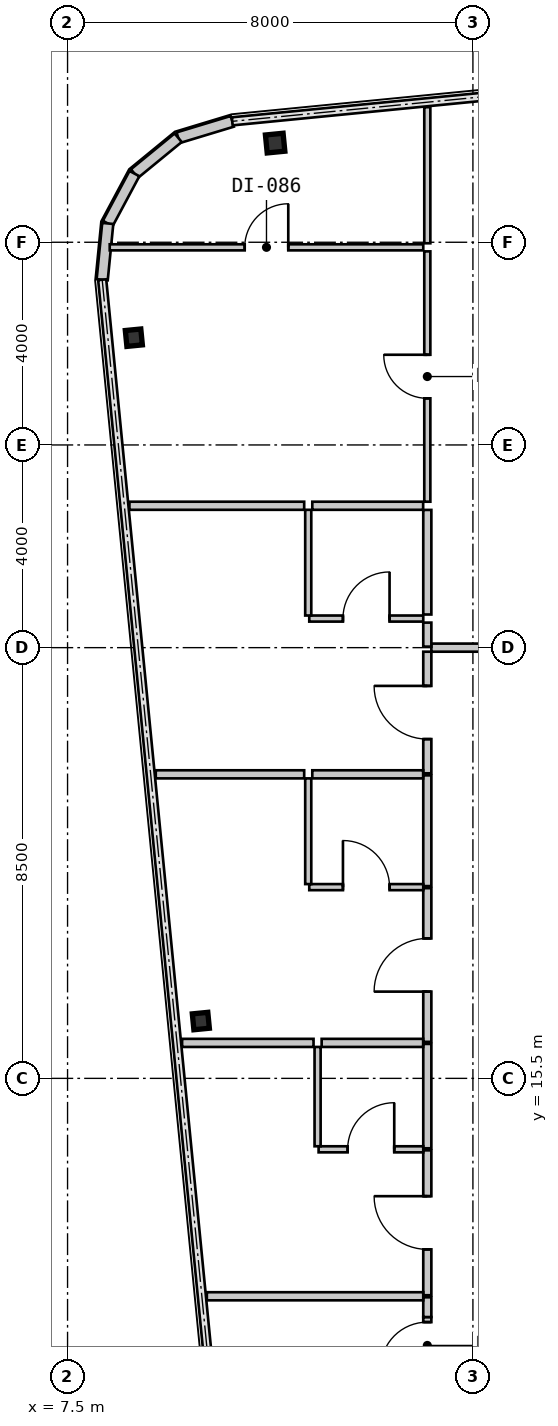
"""IFC4 building model, lengths in metres.
Left out: names, types, materials, properties, quantities, classifications, styles, units other than length and angle.
Written with IfcOpenShell. Run it as: python <this file> out.ifc"""

import sys

from ifc_helpers import new_model, si_unit, direction, frame, frame_2d, origin, origin_2d, place, context, subcontext, project, spatial, rectangle, i_section, extrude, source, transform, mapped, element, fill, save


model = new_model("IFC4")
c1 = context("Model", 3, precision=1e-05, world=origin(), true_north=direction((0.0, 1.0)))
c2 = subcontext(c1, "Body", "Model", "MODEL_VIEW")
j1 = project(units=[si_unit("LENGTHUNIT", "METRE"), si_unit("PLANEANGLEUNIT", "RADIAN")], contexts=[c1])
p1 = place(None, origin())
s1 = spatial("IfcSite", under=j1, at=p1, CompositionType="ELEMENT")
p2 = place(p1, origin())
s2 = spatial("IfcBuilding", under=s1, at=p2, CompositionType="ELEMENT")
p3 = place(p2, frame((0.0, 0.0, 68.25)))
s3 = spatial("IfcBuildingStorey", under=s2, at=p3, CompositionType="ELEMENT", Elevation=68.25)
m1 = source(origin(), c2, "Body", "SweptSolid", [
    extrude(i_section(OverallWidth=0.35, OverallDepth=0.356, WebThickness=0.018, FlangeThickness=0.028, at=origin_2d()), origin(), (0.0, 0.0, 1.0), 3.15),
])
p4 = place(p3, frame((11.597, 33.957, 0.0), z_axis=(0.0, 0.0, 1.0), x_axis=(0.995227399982, 0.097582899759, 0.0)))
e1 = element("IfcColumn", 1, at=p4, inside=s3, PredefinedType="COLUMN", context=c2, shape_type="MappedRepresentation", body=[
    mapped(m1, transform((0.0, 0.0, 0.0), scale=1.0)),
])
m2 = source(origin(), c2, "Body", "SweptSolid", [
    extrude(i_section(OverallWidth=0.307, OverallDepth=0.315, WebThickness=0.012, FlangeThickness=0.019, at=origin_2d()), origin(), (0.0, 0.0, 1.0), 3.15),
])
for number, where, z_axis, x_axis in (
    (2, (10.131, 16.631, 0.0), (0.0, 0.0, 1.0), (0.995, 0.098, 0.0)),
    (3, (8.808, 30.116, 0.0), (0.0, 0.0, 1.0), (0.995, 0.098, 0.0)),
):
    element("IfcColumn", number, at=place(p3, frame(where, z_axis=z_axis, x_axis=x_axis)), inside=s3, PredefinedType="COLUMN", context=c2, shape_type="MappedRepresentation", body=[
        mapped(m2, transform((0.0, 0.0, 0.0), scale=1.0)),
    ])
m3 = source(origin(), c2, "Body", "SweptSolid", [
    extrude(rectangle(XDim=1.116, YDim=0.22, at=frame_2d((0.558, 0.0))), origin(), (0.0, 0.0, 1.0), 2.93),
])
p5 = place(p3, frame((10.751, 34.386, 0.0), z_axis=(0.0, 0.0, 1.0), x_axis=(-0.957070388811, -0.289855603468, 0.0)))
e4 = element("IfcWall", 4, at=p5, inside=s3, PredefinedType="SOLIDWALL", context=c2, shape_type="MappedRepresentation", body=[
    mapped(m3, transform((0.0, 0.0, 0.0), scale=1.0)),
])
m4 = source(origin(), c2, "Body", "SweptSolid", [
    extrude(rectangle(XDim=1.116, YDim=0.22, at=frame_2d((0.558, 0.0))), origin(), (0.0, 0.0, 1.0), 2.93),
])
p6 = place(p3, frame((9.683, 34.063, 0.0), z_axis=(0.0, 0.0, 1.0), x_axis=(-0.773254916409, -0.634095287989, 0.0)))
e5 = element("IfcWall", 5, at=p6, inside=s3, PredefinedType="SOLIDWALL", context=c2, shape_type="MappedRepresentation", body=[
    mapped(m4, transform((0.0, 0.0, 0.0), scale=1.0)),
])
m5 = source(origin(), c2, "Body", "SweptSolid", [
    extrude(rectangle(XDim=1.116, YDim=0.22, at=frame_2d((0.558, 0.0))), origin(), (0.0, 0.0, 1.0), 2.93),
])
p7 = place(p3, frame((8.82, 33.355, 0.0), z_axis=(0.0, 0.0, 1.0), x_axis=(-0.471802540493, -0.881704237704, 0.0)))
e6 = element("IfcWall", 6, at=p7, inside=s3, PredefinedType="SOLIDWALL", context=c2, shape_type="MappedRepresentation", body=[
    mapped(m5, transform((0.0, 0.0, 0.0), scale=1.0)),
])
p8 = place(p3, frame((8.293, 32.371, 0.0), z_axis=(0.0, 0.0, 1.0), x_axis=(-0.098463783145, -0.99514063499, 0.0)))
e7 = element("IfcWall", 7, at=p8, inside=s3, PredefinedType="SOLIDWALL", context=c2, shape_type="MappedRepresentation", body=[
    mapped(m4, transform((0.0, 0.0, 0.0), scale=1.0)),
])
m6 = source(origin(), c2, "Body", "SweptSolid", [
    extrude(rectangle(XDim=1.51, YDim=0.16, at=frame_2d((0.755, 0.0))), origin(), (0.0, 0.0, 1.0), 2.623),
])
p9 = place(p3, frame((14.6, 9.28, 0.0), z_axis=(0.0, 0.0, 1.0), x_axis=(0.0, 1.0, 0.0)))
e8 = element("IfcWall", 8, at=p9, inside=s3, PredefinedType="PARTITIONING", context=c2, shape_type="MappedRepresentation", body=[
    mapped(m6, transform((0.0, 0.0, 0.0), scale=1.0)),
])
m7 = source(origin(), c2, "Body", "SweptSolid", [
    extrude(rectangle(XDim=0.92, YDim=2.1, at=frame_2d((0.46, 1.05))), frame((0.0, 0.09, 0.0), z_axis=(0.0, -1.0, 0.0), x_axis=(1.0, 0.0, 0.0)), (0.0, 0.0, 1.0), 0.18),
])
p10 = place(p9, frame((0.49, 0.0, 0.0)))
e9 = element("IfcOpeningElement", 9, at=p10, cuts=e8, PredefinedType="OPENING", context=c2, shape_type="MappedRepresentation", body=[
    mapped(m7, transform((0.0, 0.0, 0.0), scale=1.0)),
])
m8 = source(origin(), c2, "Body", "SweptSolid", [
    extrude(rectangle(XDim=0.39, YDim=0.16, at=frame_2d((0.195, 0.0))), origin(), (0.0, 0.0, 1.0), 2.93),
])
p11 = place(p3, frame((14.6, 10.79, 0.0), z_axis=(0.0, 0.0, 1.0), x_axis=(0.0, 1.0, 0.0)))
e10 = element("IfcWall", 10, at=p11, inside=s3, PredefinedType="PARTITIONING", context=c2, shape_type="MappedRepresentation", body=[
    mapped(m8, transform((0.0, 0.0, 0.0), scale=1.0)),
])
m9 = source(origin(), c2, "Body", "SweptSolid", [
    extrude(rectangle(XDim=2.86, YDim=0.16, at=frame_2d((1.43, 0.0))), origin(), (0.0, 0.0, 1.0), 2.93),
])
p12 = place(p3, frame((14.6, 11.22, 0.0), z_axis=(0.0, 0.0, 1.0), x_axis=(0.0, 1.0, 0.0)))
e11 = element("IfcWall", 11, at=p12, inside=s3, PredefinedType="PARTITIONING", context=c2, shape_type="MappedRepresentation", body=[
    mapped(m9, transform((0.0, 0.0, 0.0), scale=1.0)),
])
m10 = source(origin(), c2, "Body", "SweptSolid", [
    extrude(rectangle(XDim=1.05, YDim=2.1, at=frame_2d((0.525, 1.05))), frame((0.0, 0.09, 0.0), z_axis=(0.0, -1.0, 0.0), x_axis=(1.0, 0.0, 0.0)), (0.0, 0.0, 1.0), 0.18),
])
p13 = place(p12, frame((0.905, 0.0, 0.0)))
e12 = element("IfcOpeningElement", 12, at=p13, cuts=e11, PredefinedType="OPENING", context=c2, shape_type="MappedRepresentation", body=[
    mapped(m10, transform((0.0, 0.0, 0.0), scale=1.0)),
])
m11 = source(origin(), c2, "Body", "SweptSolid", [
    extrude(rectangle(XDim=2.06, YDim=0.16, at=frame_2d((1.03, 0.0))), origin(), (0.0, 0.0, 1.0), 2.93),
])
p14 = place(p3, frame((14.6, 14.12, 0.0), z_axis=(0.0, 0.0, 1.0), x_axis=(0.0, 1.0, 0.0)))
e13 = element("IfcWall", 13, at=p14, inside=s3, PredefinedType="PARTITIONING", context=c2, shape_type="MappedRepresentation", body=[
    mapped(m11, transform((0.0, 0.0, 0.0), scale=1.0)),
])
m12 = source(origin(), c2, "Body", "SweptSolid", [
    extrude(rectangle(XDim=3.034, YDim=0.16, at=frame_2d((1.517, 0.0))), origin(), (0.0, 0.0, 1.0), 2.93),
])
p15 = place(p3, frame((14.6, 16.22, 0.0), z_axis=(0.0, 0.0, 1.0), x_axis=(0.0, 1.0, 0.0)))
e14 = element("IfcWall", 14, at=p15, inside=s3, PredefinedType="PARTITIONING", context=c2, shape_type="MappedRepresentation", body=[
    mapped(m12, transform((0.0, 0.0, 0.0), scale=1.0)),
])
p16 = place(p15, frame((0.992, 0.0, 0.0)))
e15 = element("IfcOpeningElement", 15, at=p16, cuts=e14, PredefinedType="OPENING", context=c2, shape_type="MappedRepresentation", body=[
    mapped(m10, transform((0.0, 0.0, 0.0), scale=1.0)),
])
m13 = source(origin(), c2, "Body", "SweptSolid", [
    extrude(rectangle(XDim=2.186, YDim=0.16, at=frame_2d((1.093, 0.0))), origin(), (0.0, 0.0, 1.0), 2.93),
])
p17 = place(p3, frame((14.6, 19.294, 0.0), z_axis=(0.0, 0.0, 1.0), x_axis=(0.0, 1.0, 0.0)))
e16 = element("IfcWall", 16, at=p17, inside=s3, PredefinedType="PARTITIONING", context=c2, shape_type="MappedRepresentation", body=[
    mapped(m13, transform((0.0, 0.0, 0.0), scale=1.0)),
])
m14 = source(origin(), c2, "Body", "SweptSolid", [
    extrude(rectangle(XDim=2.4, YDim=0.16, at=frame_2d((1.2, 0.0))), origin(), (0.0, 0.0, 1.0), 2.93),
])
p18 = place(p3, frame((14.6, 21.52, 0.0), z_axis=(0.0, 0.0, 1.0), x_axis=(0.0, 1.0, 0.0)))
e17 = element("IfcWall", 17, at=p18, inside=s3, PredefinedType="PARTITIONING", context=c2, shape_type="MappedRepresentation", body=[
    mapped(m14, transform((0.0, 0.0, 0.0), scale=1.0)),
])
p19 = place(p18, frame((0.675, 0.0, 0.0)))
e18 = element("IfcOpeningElement", 18, at=p19, cuts=e17, PredefinedType="OPENING", context=c2, shape_type="MappedRepresentation", body=[
    mapped(m10, transform((0.0, 0.0, 0.0), scale=1.0)),
])
m15 = source(origin(), c2, "Body", "SweptSolid", [
    extrude(rectangle(XDim=4.17, YDim=0.16, at=frame_2d((2.085, 0.0))), origin(), (0.0, 0.0, 1.0), 2.93),
])
p20 = place(p3, frame((14.68, 24.0, 0.0), z_axis=(0.0, 0.0, 1.0), x_axis=(1.0, 0.0, 0.0)))
e19 = element("IfcWall", 19, at=p20, inside=s3, PredefinedType="PARTITIONING", context=c2, shape_type="MappedRepresentation", body=[
    mapped(m15, transform((0.0, 0.0, 0.0), scale=1.0)),
])
p21 = place(p20, frame((1.69, 0.0, 0.0)))
e20 = element("IfcOpeningElement", 20, at=p21, cuts=e19, PredefinedType="OPENING", context=c2, shape_type="MappedRepresentation", body=[
    mapped(m7, transform((0.0, 0.0, 0.0), scale=1.0)),
])
m16 = source(origin(), c2, "Body", "SweptSolid", [
    extrude(rectangle(XDim=4.271, YDim=0.16, at=frame_2d((2.136, 0.0))), origin(), (0.0, 0.0, 1.0), 2.93),
])
p22 = place(p3, frame((10.249, 11.2, 0.0), z_axis=(0.0, 0.0, 1.0), x_axis=(1.0, 0.0, 0.0)))
e21 = element("IfcWall", 21, at=p22, inside=s3, PredefinedType="PARTITIONING", context=c2, shape_type="MappedRepresentation", body=[
    mapped(m16, transform((0.0, 0.0, 0.0), scale=1.0)),
])
m17 = source(origin(), c2, "Body", "SweptSolid", [
    extrude(rectangle(XDim=2.065, YDim=0.12, at=frame_2d((1.033, 0.0))), origin(), (0.0, 0.0, 1.0), 2.93),
])
p23 = place(p3, frame((12.455, 14.1, 0.0), z_axis=(0.0, 0.0, 1.0), x_axis=(1.0, 0.0, 0.0)))
e22 = element("IfcWall", 22, at=p23, inside=s3, PredefinedType="PARTITIONING", context=c2, shape_type="MappedRepresentation", body=[
    mapped(m17, transform((0.0, 0.0, 0.0), scale=1.0)),
])
m18 = source(origin(), c2, "Body", "SweptSolid", [
    extrude(rectangle(XDim=0.92, YDim=2.1, at=frame_2d((0.46, 1.05))), frame((0.0, 0.07, 0.0), z_axis=(0.0, -1.0, 0.0), x_axis=(1.0, 0.0, 0.0)), (0.0, 0.0, 1.0), 0.14),
])
p24 = place(p23, frame((0.573, 0.0, 0.0)))
e23 = element("IfcOpeningElement", 23, at=p24, cuts=e22, PredefinedType="OPENING", context=c2, shape_type="MappedRepresentation", body=[
    mapped(m18, transform((0.0, 0.0, 0.0), scale=1.0)),
])
m19 = source(origin(), c2, "Body", "SweptSolid", [
    extrude(rectangle(XDim=1.96, YDim=0.12, at=frame_2d((0.98, 0.0))), origin(), (0.0, 0.0, 1.0), 2.93),
])
p25 = place(p3, frame((12.435, 16.12, 0.0), z_axis=(0.0, 0.0, 1.0), x_axis=(0.0, -1.0, 0.0)))
e24 = element("IfcWall", 24, at=p25, inside=s3, PredefinedType="PARTITIONING", context=c2, shape_type="MappedRepresentation", body=[
    mapped(m19, transform((0.0, 0.0, 0.0), scale=1.0)),
])
m20 = source(origin(), c2, "Body", "SweptSolid", [
    extrude(rectangle(XDim=2.594, YDim=0.16, at=frame_2d((1.297, 0.0))), origin(), (0.0, 0.0, 1.0), 2.93),
])
p26 = place(p3, frame((9.76, 16.2, 0.0), z_axis=(0.0, 0.0, 1.0), x_axis=(1.0, 0.0, 0.0)))
e25 = element("IfcWall", 25, at=p26, inside=s3, PredefinedType="PARTITIONING", context=c2, shape_type="MappedRepresentation", body=[
    mapped(m20, transform((0.0, 0.0, 0.0), scale=1.0)),
])
m21 = source(origin(), c2, "Body", "SweptSolid", [
    extrude(rectangle(XDim=2.003, YDim=0.16, at=frame_2d((1.002, 0.0))), origin(), (0.0, 0.0, 1.0), 2.93),
])
p27 = place(p3, frame((12.515, 16.2, 0.0), z_axis=(0.0, 0.0, 1.0), x_axis=(1.0, 0.0, 0.0)))
e26 = element("IfcWall", 26, at=p27, inside=s3, PredefinedType="PARTITIONING", context=c2, shape_type="MappedRepresentation", body=[
    mapped(m21, transform((0.0, 0.0, 0.0), scale=1.0)),
])
m22 = source(origin(), c2, "Body", "SweptSolid", [
    extrude(rectangle(XDim=2.25, YDim=0.12, at=frame_2d((1.125, 0.0))), origin(), (0.0, 0.0, 1.0), 2.93),
])
p28 = place(p3, frame((12.27, 19.274, 0.0), z_axis=(0.0, 0.0, 1.0), x_axis=(1.0, 0.0, 0.0)))
e27 = element("IfcWall", 27, at=p28, inside=s3, PredefinedType="PARTITIONING", context=c2, shape_type="MappedRepresentation", body=[
    mapped(m22, transform((0.0, 0.0, 0.0), scale=1.0)),
])
p29 = place(p28, frame((0.665, 0.0, 0.0)))
e28 = element("IfcOpeningElement", 28, at=p29, cuts=e27, PredefinedType="OPENING", context=c2, shape_type="MappedRepresentation", body=[
    mapped(m18, transform((0.0, 0.0, 0.0), scale=1.0)),
])
m23 = source(origin(), c2, "Body", "SweptSolid", [
    extrude(rectangle(XDim=2.086, YDim=0.12, at=frame_2d((1.043, 0.0))), origin(), (0.0, 0.0, 1.0), 2.93),
])
p30 = place(p3, frame((12.25, 21.42, 0.0), z_axis=(0.0, 0.0, 1.0), x_axis=(0.0, -1.0, 0.0)))
e29 = element("IfcWall", 29, at=p30, inside=s3, PredefinedType="PARTITIONING", context=c2, shape_type="MappedRepresentation", body=[
    mapped(m23, transform((0.0, 0.0, 0.0), scale=1.0)),
])
m24 = source(origin(), c2, "Body", "SweptSolid", [
    extrude(rectangle(XDim=2.929, YDim=0.16, at=frame_2d((1.464, 0.0))), origin(), (0.0, 0.0, 1.0), 2.93),
])
p31 = place(p3, frame((9.241, 21.5, 0.0), z_axis=(0.0, 0.0, 1.0), x_axis=(1.0, 0.0, 0.0)))
e30 = element("IfcWall", 30, at=p31, inside=s3, PredefinedType="PARTITIONING", context=c2, shape_type="MappedRepresentation", body=[
    mapped(m24, transform((0.0, 0.0, 0.0), scale=1.0)),
])
m25 = source(origin(), c2, "Body", "SweptSolid", [
    extrude(rectangle(XDim=2.188, YDim=0.16, at=frame_2d((1.094, 0.0))), origin(), (0.0, 0.0, 1.0), 2.93),
])
p32 = place(p3, frame((12.33, 21.5, 0.0), z_axis=(0.0, 0.0, 1.0), x_axis=(1.0, 0.0, 0.0)))
e31 = element("IfcWall", 31, at=p32, inside=s3, PredefinedType="PARTITIONING", context=c2, shape_type="MappedRepresentation", body=[
    mapped(m25, transform((0.0, 0.0, 0.0), scale=1.0)),
])
p33 = place(p3, frame((12.27, 24.574, 0.0), z_axis=(0.0, 0.0, 1.0), x_axis=(1.0, 0.0, 0.0)))
e32 = element("IfcWall", 32, at=p33, inside=s3, PredefinedType="PARTITIONING", context=c2, shape_type="MappedRepresentation", body=[
    mapped(m22, transform((0.0, 0.0, 0.0), scale=1.0)),
])
p34 = place(p33, frame((0.665, 0.0, 0.0)))
e33 = element("IfcOpeningElement", 33, at=p34, cuts=e32, PredefinedType="OPENING", context=c2, shape_type="MappedRepresentation", body=[
    mapped(m18, transform((0.0, 0.0, 0.0), scale=1.0)),
])
p35 = place(p3, frame((12.25, 26.72, 0.0), z_axis=(0.0, 0.0, 1.0), x_axis=(0.0, -1.0, 0.0)))
e34 = element("IfcWall", 34, at=p35, inside=s3, PredefinedType="PARTITIONING", context=c2, shape_type="MappedRepresentation", body=[
    mapped(m23, transform((0.0, 0.0, 0.0), scale=1.0)),
])
m26 = source(origin(), c2, "Body", "SweptSolid", [
    extrude(rectangle(XDim=3.449, YDim=0.16, at=frame_2d((1.724, 0.0))), origin(), (0.0, 0.0, 1.0), 2.93),
])
p36 = place(p3, frame((8.721, 26.8, 0.0), z_axis=(0.0, 0.0, 1.0), x_axis=(1.0, 0.0, 0.0)))
e35 = element("IfcWall", 35, at=p36, inside=s3, PredefinedType="PARTITIONING", context=c2, shape_type="MappedRepresentation", body=[
    mapped(m26, transform((0.0, 0.0, 0.0), scale=1.0)),
])
m27 = source(origin(), c2, "Body", "SweptSolid", [
    extrude(rectangle(XDim=0.474, YDim=0.16, at=frame_2d((0.237, 0.0))), origin(), (0.0, 0.0, 1.0), 2.93),
])
p37 = place(p3, frame((14.6, 24.494, 0.0), z_axis=(0.0, 0.0, 1.0), x_axis=(0.0, -1.0, 0.0)))
e36 = element("IfcWall", 36, at=p37, inside=s3, PredefinedType="PARTITIONING", context=c2, shape_type="MappedRepresentation", body=[
    mapped(m27, transform((0.0, 0.0, 0.0), scale=1.0)),
])
p38 = place(p3, frame((12.33, 26.8, 0.0), z_axis=(0.0, 0.0, 1.0), x_axis=(1.0, 0.0, 0.0)))
e37 = element("IfcWall", 37, at=p38, inside=s3, PredefinedType="PARTITIONING", context=c2, shape_type="MappedRepresentation", body=[
    mapped(m25, transform((0.0, 0.0, 0.0), scale=1.0)),
])
m28 = source(origin(), c2, "Body", "SweptSolid", [
    extrude(rectangle(XDim=2.064, YDim=0.16, at=frame_2d((1.032, 0.0))), origin(), (0.0, 0.0, 1.0), 2.93),
])
p39 = place(p3, frame((14.6, 26.718, 0.0), z_axis=(0.0, 0.0, 1.0), x_axis=(0.0, -1.0, 0.0)))
e38 = element("IfcWall", 38, at=p39, inside=s3, PredefinedType="PARTITIONING", context=c2, shape_type="MappedRepresentation", body=[
    mapped(m28, transform((0.0, 0.0, 0.0), scale=1.0)),
])
m29 = source(origin(), c2, "Body", "SweptSolid", [
    extrude(rectangle(XDim=6.188, YDim=0.12, at=frame_2d((3.094, 0.0))), origin(), (0.0, 0.0, 1.0), 2.93),
])
p40 = place(p3, frame((8.332, 31.9, 0.0), z_axis=(0.0, 0.0, 1.0), x_axis=(1.0, 0.0, 0.0)))
e39 = element("IfcWall", 39, at=p40, inside=s3, PredefinedType="PARTITIONING", context=c2, shape_type="MappedRepresentation", body=[
    mapped(m29, transform((0.0, 0.0, 0.0), scale=1.0)),
])
m30 = source(origin(), c2, "Body", "SweptSolid", [
    extrude(rectangle(XDim=0.86, YDim=2.1, at=frame_2d((0.43, 1.05))), frame((0.0, 0.07, 0.0), z_axis=(0.0, -1.0, 0.0), x_axis=(1.0, 0.0, 0.0)), (0.0, 0.0, 1.0), 0.14),
])
p41 = place(p40, frame((2.664, 0.0, 0.0)))
e40 = element("IfcOpeningElement", 40, at=p41, cuts=e39, PredefinedType="OPENING", context=c2, shape_type="MappedRepresentation", body=[
    mapped(m30, transform((0.0, 0.0, 0.0), scale=1.0)),
])
m31 = source(origin(), c2, "Body", "SweptSolid", [
    extrude(rectangle(XDim=4.94, YDim=0.12, at=frame_2d((2.47, 0.0))), origin(), (0.0, 0.0, 1.0), 2.93),
])
p42 = place(p3, frame((14.6, 31.82, 0.0), z_axis=(0.0, 0.0, 1.0), x_axis=(0.0, -1.0, 0.0)))
e41 = element("IfcWall", 41, at=p42, inside=s3, PredefinedType="PARTITIONING", context=c2, shape_type="MappedRepresentation", body=[
    mapped(m31, transform((0.0, 0.0, 0.0), scale=1.0)),
])
p43 = place(p42, frame((2.04, 0.0, 0.0)))
e42 = element("IfcOpeningElement", 42, at=p43, cuts=e41, PredefinedType="OPENING", context=c2, shape_type="MappedRepresentation", body=[
    mapped(m30, transform((0.0, 0.0, 0.0), scale=1.0)),
])
m32 = source(origin(), c2, "Body", "SweptSolid", [
    extrude(rectangle(XDim=2.686, YDim=0.12, at=frame_2d((1.343, 0.0))), origin(), (0.0, 0.0, 1.0), 2.93),
])
p44 = place(p3, frame((14.6, 34.666, 0.0), z_axis=(0.0, 0.0, 1.0), x_axis=(0.0, -1.0, 0.0)))
e43 = element("IfcWall", 43, at=p44, inside=s3, PredefinedType="PARTITIONING", context=c2, shape_type="MappedRepresentation", body=[
    mapped(m32, transform((0.0, 0.0, 0.0), scale=1.0)),
])
m33 = source(origin(), c2, "Body", "SweptSolid", [
    extrude(rectangle(XDim=0.92, YDim=2.1, at=frame_2d((0.46, 1.05))), frame((0.0, 0.025, 0.0), z_axis=(0.0, -1.0, 0.0), x_axis=(1.0, 0.0, 0.0)), (0.0, 0.0, 1.0), 0.05),
])
p45 = place(p10, origin())
e44 = element("IfcDoor", 44, at=p45, inside=s3, OperationType="SINGLE_SWING_LEFT", PredefinedType="DOOR", context=c2, shape_type="MappedRepresentation", body=[
    mapped(m33, transform((0.0, 0.0, 0.0), scale=1.0)),
])
fill(e9, e44)
m34 = source(origin(), c2, "Body", "SweptSolid", [
    extrude(rectangle(XDim=1.05, YDim=2.1, at=frame_2d((0.525, 1.05))), frame((0.0, 0.025, 0.0), z_axis=(0.0, -1.0, 0.0), x_axis=(1.0, 0.0, 0.0)), (0.0, 0.0, 1.0), 0.05),
])
p46 = place(p13, origin())
e45 = element("IfcDoor", 45, at=p46, inside=s3, OperationType="SINGLE_SWING_RIGHT", PredefinedType="DOOR", context=c2, shape_type="MappedRepresentation", body=[
    mapped(m34, transform((0.0, 0.0, 0.0), scale=1.0)),
])
fill(e12, e45)
p47 = place(p16, origin())
e46 = element("IfcDoor", 46, at=p47, inside=s3, OperationType="SINGLE_SWING_LEFT", PredefinedType="DOOR", context=c2, shape_type="MappedRepresentation", body=[
    mapped(m34, transform((0.0, 0.0, 0.0), scale=1.0)),
])
fill(e15, e46)
p48 = place(p19, origin())
e47 = element("IfcDoor", 47, at=p48, inside=s3, OperationType="SINGLE_SWING_RIGHT", PredefinedType="DOOR", context=c2, shape_type="MappedRepresentation", body=[
    mapped(m34, transform((0.0, 0.0, 0.0), scale=1.0)),
])
fill(e18, e47)
p49 = place(p24, origin())
e48 = element("IfcDoor", 48, at=p49, inside=s3, OperationType="SINGLE_SWING_RIGHT", PredefinedType="DOOR", context=c2, shape_type="MappedRepresentation", body=[
    mapped(m33, transform((0.0, 0.0, 0.0), scale=1.0)),
])
fill(e23, e48)
p50 = place(p29, origin())
e49 = element("IfcDoor", 49, at=p50, inside=s3, OperationType="SINGLE_SWING_LEFT", PredefinedType="DOOR", context=c2, shape_type="MappedRepresentation", body=[
    mapped(m33, transform((0.0, 0.0, 0.0), scale=1.0)),
])
fill(e28, e49)
p51 = place(p34, origin())
e50 = element("IfcDoor", 50, at=p51, inside=s3, OperationType="SINGLE_SWING_RIGHT", PredefinedType="DOOR", context=c2, shape_type="MappedRepresentation", body=[
    mapped(m33, transform((0.0, 0.0, 0.0), scale=1.0)),
])
fill(e33, e50)
m35 = source(origin(), c2, "Body", "SweptSolid", [
    extrude(rectangle(XDim=0.86, YDim=2.1, at=frame_2d((0.43, 1.05))), frame((0.0, 0.025, 0.0), z_axis=(0.0, -1.0, 0.0), x_axis=(1.0, 0.0, 0.0)), (0.0, 0.0, 1.0), 0.05),
])
p52 = place(p43, frame((0.86, 0.0, 0.0), z_axis=(0.0, 0.0, 1.0), x_axis=(-1.0, 0.0, 0.0)))
e51 = element("IfcDoor", 51, at=p52, inside=s3, OperationType="SINGLE_SWING_RIGHT", PredefinedType="DOOR", context=c2, shape_type="MappedRepresentation", body=[
    mapped(m35, transform((0.0, 0.0, 0.0), scale=1.0)),
])
fill(e42, e51)
p53 = place(p41, origin())
e52 = element("IfcDoor", 52, at=p53, inside=s3, OperationType="SINGLE_SWING_RIGHT", PredefinedType="DOOR", context=c2, shape_type="MappedRepresentation", body=[
    mapped(m35, transform((0.0, 0.0, 0.0), scale=1.0)),
])
fill(e40, e52)
save(model, sys.argv[1])
